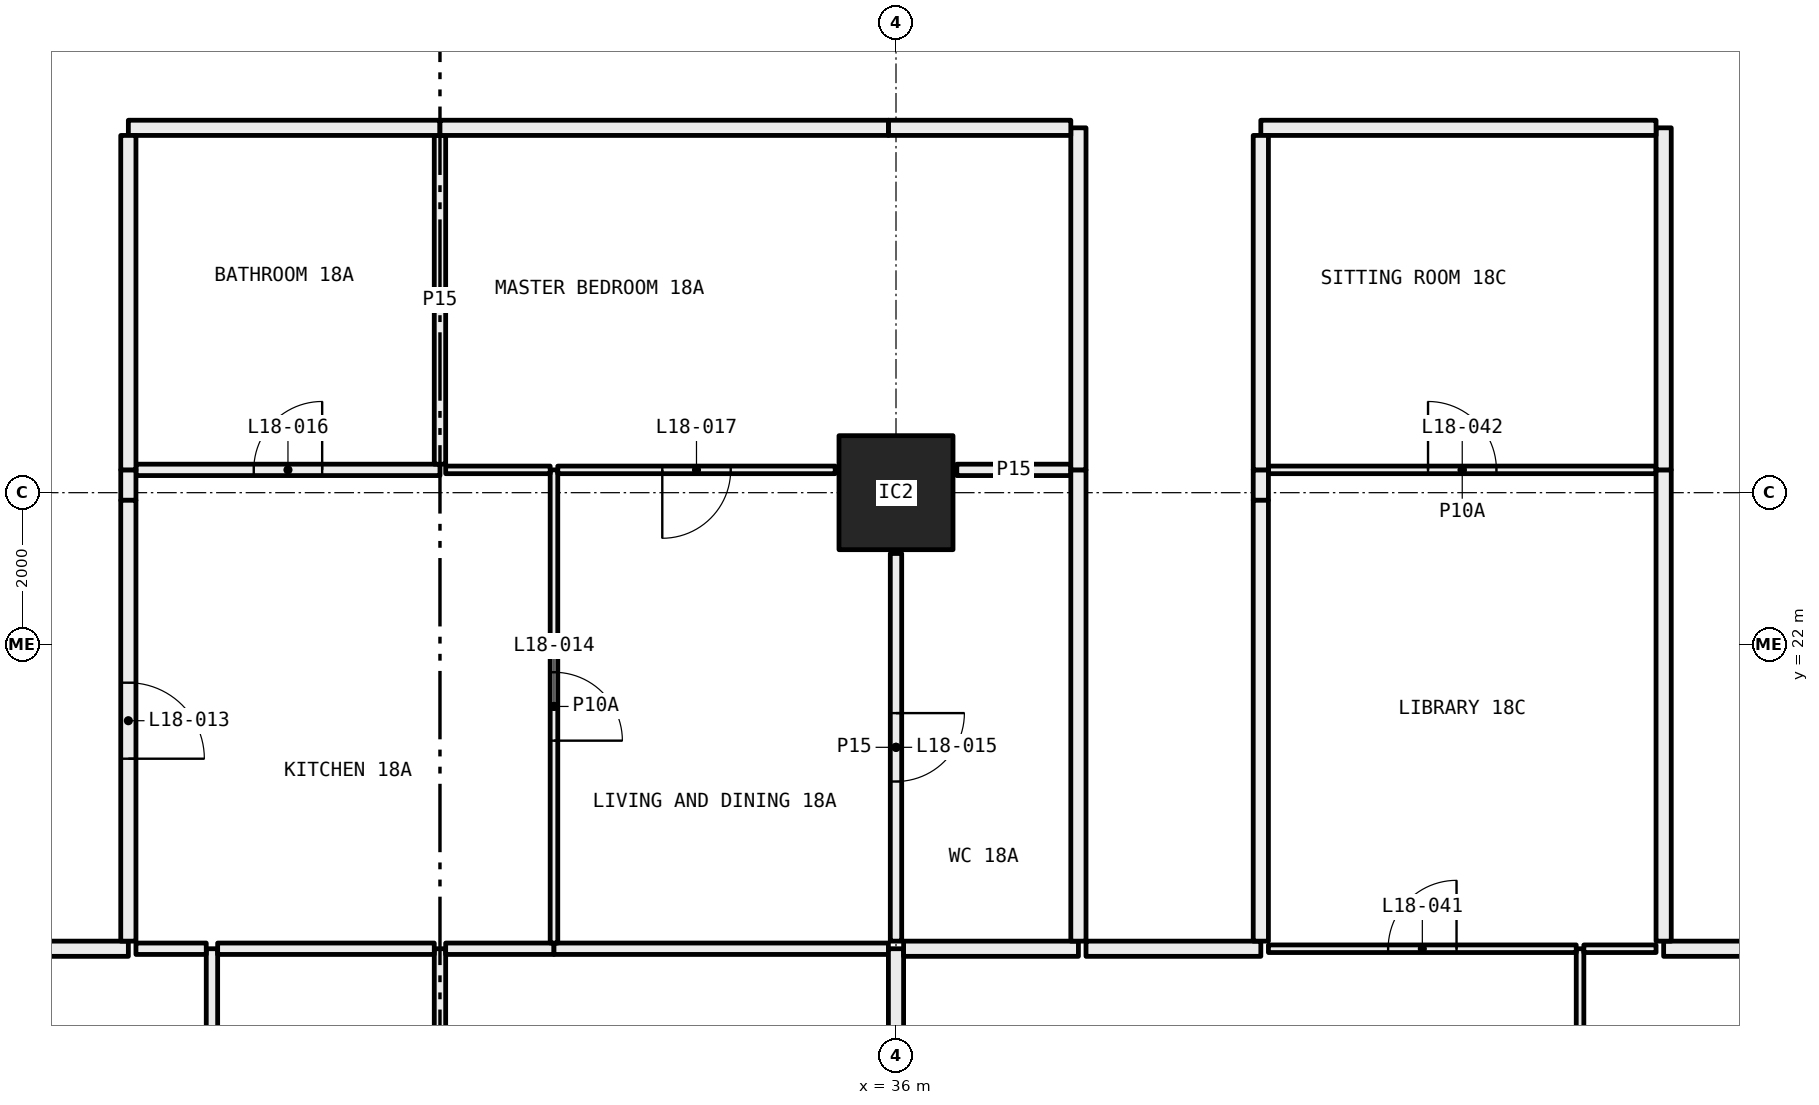
"""IFC4 building model, lengths in metres.
Left out: names, types, materials, properties, quantities, classifications, styles, units other than length and angle.
Written with IfcOpenShell. Run it as: python <this file> out.ifc"""

import sys

from ifc_helpers import new_model, si_unit, direction, frame, frame_2d, origin, origin_2d, place, context, subcontext, project, spatial, rectangle, hollow_rectangle, extrude, element, fill, save


model = new_model("IFC4")
c1 = context("Model", 3, precision=1e-05, world=origin(), true_north=direction((0.0, 1.0)))
c2 = subcontext(c1, "Body", "Model", "MODEL_VIEW")
j1 = project(units=[si_unit("LENGTHUNIT", "METRE"), si_unit("PLANEANGLEUNIT", "RADIAN")], contexts=[c1])
p1 = place(None, origin())
s1 = spatial("IfcSite", under=j1, at=p1, CompositionType="ELEMENT")
p2 = place(p1, origin())
s2 = spatial("IfcBuilding", under=s1, at=p2, CompositionType="ELEMENT")
p3 = place(p2, frame((0.0, 0.0, 74.85)))
s3 = spatial("IfcBuildingStorey", under=s2, at=p3, CompositionType="ELEMENT", Elevation=74.85)
p4 = place(p3, frame((36.0, 24.0, 0.0), z_axis=(0.0, 0.0, 1.0), x_axis=(1.0, 0.0, 0.0)))
e1 = element("IfcColumn", 1, at=p4, inside=s3, PredefinedType="COLUMN", context=c2, shape_type="SweptSolid", body=[
    extrude(hollow_rectangle(XDim=1.5, YDim=1.5, WallThickness=0.065, at=origin_2d()), origin(), (0.0, 0.0, 1.0), 3.05),
])
p5 = place(p3, frame((27.0, 12.075, 0.0), z_axis=(0.0, 0.0, 1.0), x_axis=(0.0, 1.0, 0.0)))
e2 = element("IfcWall", 2, at=p5, inside=s3, PredefinedType="PARTITIONING", context=c2, shape_type="SweptSolid", body=[
    extrude(rectangle(XDim=5.925, YDim=0.15, at=frame_2d((2.962, 0.0))), origin(), (0.0, 0.0, 1.0), 2.45),
])
p6 = place(p3, frame((26.925, 18.0, 0.0), z_axis=(0.0, 0.0, 1.0), x_axis=(-1.0, 0.0, 0.0)))
e3 = element("IfcWall", 3, at=p6, inside=s3, PredefinedType="PARTITIONING", context=c2, shape_type="SweptSolid", body=[
    extrude(rectangle(XDim=0.925, YDim=0.15, at=frame_2d((0.462, 0.0))), origin(), (0.0, 0.0, 1.0), 3.05),
])
p7 = place(p3, frame((25.9, 18.0, 0.0), z_axis=(0.0, 0.0, 1.0), x_axis=(-1.0, 0.0, 0.0)))
e4 = element("IfcWall", 4, at=p7, inside=s3, PredefinedType="PARTITIONING", context=c2, shape_type="SweptSolid", body=[
    extrude(rectangle(XDim=3.4, YDim=0.2, at=frame_2d((1.7, 0.0))), origin(), (0.0, 0.0, 1.0), 3.05),
])
p8 = place(p3, frame((30.0, 12.075, 0.0), z_axis=(0.0, 0.0, 1.0), x_axis=(0.0, 1.0, 0.0)))
e5 = element("IfcWall", 5, at=p8, inside=s3, PredefinedType="PARTITIONING", context=c2, shape_type="SweptSolid", body=[
    extrude(rectangle(XDim=5.925, YDim=0.15, at=frame_2d((2.962, 0.0))), origin(), (0.0, 0.0, 1.0), 2.45),
])
p9 = place(p3, frame((29.925, 18.0, 0.0), z_axis=(0.0, 0.0, 1.0), x_axis=(-1.0, 0.0, 0.0)))
e6 = element("IfcWall", 6, at=p9, inside=s3, PredefinedType="PARTITIONING", context=c2, shape_type="SweptSolid", body=[
    extrude(rectangle(XDim=2.85, YDim=0.15, at=frame_2d((1.425, 0.0))), origin(), (0.0, 0.0, 1.0), 3.05),
])
p10 = place(p3, frame((31.5, 18.0, 0.0), z_axis=(0.0, 0.0, 1.0), x_axis=(-1.0, 0.0, 0.0)))
e7 = element("IfcWall", 7, at=p10, inside=s3, PredefinedType="PARTITIONING", context=c2, shape_type="SweptSolid", body=[
    extrude(rectangle(XDim=1.425, YDim=0.15, at=frame_2d((0.712, 0.0))), origin(), (0.0, 0.0, 1.0), 3.05),
])
p11 = place(p3, frame((35.9, 18.0, 0.0), z_axis=(0.0, 0.0, 1.0), x_axis=(-1.0, 0.0, 0.0)))
e8 = element("IfcWall", 8, at=p11, inside=s3, PredefinedType="PARTITIONING", context=c2, shape_type="SweptSolid", body=[
    extrude(rectangle(XDim=4.4, YDim=0.15, at=frame_2d((2.2, 0.0))), origin(), (0.0, 0.0, 1.0), 3.05),
])
p12 = place(p3, frame((36.0, 12.8, 0.0), z_axis=(0.0, 0.0, 1.0), x_axis=(0.0, 1.0, 0.0)))
e9 = element("IfcWall", 9, at=p12, inside=s3, PredefinedType="PARTITIONING", context=c2, shape_type="SweptSolid", body=[
    extrude(rectangle(XDim=5.2, YDim=0.2, at=frame_2d((2.6, 0.0))), origin(), (0.0, 0.0, 1.0), 2.45),
])
p13 = place(p3, frame((31.5, 18.075, 0.0), z_axis=(0.0, 0.0, 1.0), x_axis=(0.0, 1.0, 0.0)))
e10 = element("IfcWall", 10, at=p13, inside=s3, PredefinedType="PARTITIONING", context=c2, shape_type="SweptSolid", body=[
    extrude(rectangle(XDim=6.225, YDim=0.1, at=frame_2d((3.113, 0.0))), origin(), (0.0, 0.0, 1.0), 2.45),
])
p14 = place(p13, frame((2.663, 0.0, 0.0)))
e11 = element("IfcOpeningElement", 11, at=p14, cuts=e10, PredefinedType="OPENING", context=c2, shape_type="SweptSolid", body=[
    extrude(rectangle(XDim=0.9, YDim=2.1, at=frame_2d((0.45, 1.05))), frame((0.0, 0.06, 0.0), z_axis=(0.0, -1.0, 0.0), x_axis=(1.0, 0.0, 0.0)), (0.0, 0.0, 1.0), 0.12),
])
p15 = place(p3, frame((30.0, 24.3, 0.0), z_axis=(0.0, 0.0, 1.0), x_axis=(-1.0, 0.0, 0.0)))
e12 = element("IfcWall", 12, at=p15, inside=s3, PredefinedType="PARTITIONING", context=c2, shape_type="SweptSolid", body=[
    extrude(rectangle(XDim=4.0, YDim=0.15, at=frame_2d((2.0, 0.0))), origin(), (0.0, 0.0, 1.0), 3.05),
])
p16 = place(p15, frame((1.55, 0.0, 0.0)))
e13 = element("IfcOpeningElement", 13, at=p16, cuts=e12, PredefinedType="OPENING", context=c2, shape_type="SweptSolid", body=[
    extrude(rectangle(XDim=0.9, YDim=2.1, at=frame_2d((0.45, 1.05))), frame((0.0, 0.085, 0.0), z_axis=(0.0, -1.0, 0.0), x_axis=(1.0, 0.0, 0.0)), (0.0, 0.0, 1.0), 0.17),
])
p17 = place(p3, frame((31.45, 24.3, 0.0), z_axis=(0.0, 0.0, 1.0), x_axis=(-1.0, 0.0, 0.0)))
e14 = element("IfcWall", 14, at=p17, inside=s3, PredefinedType="PARTITIONING", context=c2, shape_type="SweptSolid", body=[
    extrude(rectangle(XDim=1.375, YDim=0.1, at=frame_2d((0.688, 0.0))), origin(), (0.0, 0.0, 1.0), 3.05),
])
p18 = place(p3, frame((25.9, 24.3, 0.0), z_axis=(0.0, 0.0, 1.0), x_axis=(0.0, -1.0, 0.0)))
e15 = element("IfcWall", 15, at=p18, inside=s3, PredefinedType="PARTITIONING", context=c2, shape_type="SweptSolid", body=[
    extrude(rectangle(XDim=0.4, YDim=0.2, at=frame_2d((0.2, 0.0))), origin(), (0.0, 0.0, 1.0), 2.45),
])
p19 = place(p3, frame((25.9, 23.9, 0.0), z_axis=(0.0, 0.0, 1.0), x_axis=(0.0, -1.0, 0.0)))
e16 = element("IfcWall", 16, at=p19, inside=s3, PredefinedType="PARTITIONING", context=c2, shape_type="SweptSolid", body=[
    extrude(rectangle(XDim=5.8, YDim=0.2, at=frame_2d((2.9, 0.0))), origin(), (0.0, 0.0, 1.0), 3.05),
])
p20 = place(p19, frame((2.4, 0.0, 0.0)))
e17 = element("IfcOpeningElement", 17, at=p20, cuts=e16, PredefinedType="OPENING", context=c2, shape_type="SweptSolid", body=[
    extrude(rectangle(XDim=1.0, YDim=2.1, at=frame_2d((0.5, 1.05))), frame((0.0, 0.11, 0.0), z_axis=(0.0, -1.0, 0.0), x_axis=(1.0, 0.0, 0.0)), (0.0, 0.0, 1.0), 0.22),
])
p21 = place(p3, frame((36.0, 18.1, 0.0), z_axis=(0.0, 0.0, 1.0), x_axis=(0.0, 1.0, 0.0)))
e18 = element("IfcWall", 18, at=p21, inside=s3, PredefinedType="PARTITIONING", context=c2, shape_type="SweptSolid", body=[
    extrude(rectangle(XDim=5.1, YDim=0.15, at=frame_2d((2.55, 0.0))), origin(), (0.0, 0.0, 1.0), 2.45),
])
p22 = place(p21, frame((2.1, 0.0, 0.0)))
e19 = element("IfcOpeningElement", 19, at=p22, cuts=e18, PredefinedType="OPENING", context=c2, shape_type="SweptSolid", body=[
    extrude(rectangle(XDim=0.9, YDim=2.1, at=frame_2d((0.45, 1.05))), frame((0.0, 0.085, 0.0), z_axis=(0.0, -1.0, 0.0), x_axis=(1.0, 0.0, 0.0)), (0.0, 0.0, 1.0), 0.17),
])
p23 = place(p3, frame((35.2, 24.3, 0.0), z_axis=(0.0, 0.0, 1.0), x_axis=(-1.0, 0.0, 0.0)))
e20 = element("IfcWall", 20, at=p23, inside=s3, PredefinedType="PARTITIONING", context=c2, shape_type="SweptSolid", body=[
    extrude(rectangle(XDim=3.65, YDim=0.1, at=frame_2d((1.825, 0.0))), origin(), (0.0, 0.0, 1.0), 3.05),
])
p24 = place(p23, frame((1.375, 0.0, 0.0)))
e21 = element("IfcOpeningElement", 21, at=p24, cuts=e20, PredefinedType="OPENING", context=c2, shape_type="SweptSolid", body=[
    extrude(rectangle(XDim=0.9, YDim=2.1, at=frame_2d((0.45, 1.05))), frame((0.0, 0.06, 0.0), z_axis=(0.0, -1.0, 0.0), x_axis=(1.0, 0.0, 0.0)), (0.0, 0.0, 1.0), 0.12),
])
p25 = place(p3, frame((38.3, 24.3, 0.0), z_axis=(0.0, 0.0, 1.0), x_axis=(-1.0, 0.0, 0.0)))
e22 = element("IfcWall", 22, at=p25, inside=s3, PredefinedType="PARTITIONING", context=c2, shape_type="SweptSolid", body=[
    extrude(rectangle(XDim=1.5, YDim=0.15, at=frame_2d((0.75, 0.0))), origin(), (0.0, 0.0, 1.0), 3.05),
])
p26 = place(p3, frame((36.1, 18.0, 0.0), z_axis=(0.0, 0.0, 1.0), x_axis=(1.0, 0.0, 0.0)))
e23 = element("IfcWall", 23, at=p26, inside=s3, PredefinedType="PARTITIONING", context=c2, shape_type="SweptSolid", body=[
    extrude(rectangle(XDim=2.3, YDim=0.2, at=frame_2d((1.15, 0.0))), origin(), (0.0, 0.0, 1.0), 3.05),
])
p27 = place(p3, frame((38.4, 18.1, 0.0), z_axis=(0.0, 0.0, 1.0), x_axis=(0.0, 1.0, 0.0)))
e24 = element("IfcWall", 24, at=p27, inside=s3, PredefinedType="PARTITIONING", context=c2, shape_type="SweptSolid", body=[
    extrude(rectangle(XDim=6.2, YDim=0.2, at=frame_2d((3.1, 0.0))), origin(), (0.0, 0.0, 1.0), 2.45),
])
p28 = place(p3, frame((30.0, 24.375, 0.0), z_axis=(0.0, 0.0, 1.0), x_axis=(0.0, 1.0, 0.0)))
e25 = element("IfcWall", 25, at=p28, inside=s3, PredefinedType="PARTITIONING", context=c2, shape_type="SweptSolid", body=[
    extrude(rectangle(XDim=4.325, YDim=0.15, at=frame_2d((2.163, 0.0))), origin(), (0.0, 0.0, 1.0), 3.05),
])
p29 = place(p3, frame((30.0, 28.8, 0.0), z_axis=(0.0, 0.0, 1.0), x_axis=(-1.0, 0.0, 0.0)))
e26 = element("IfcWall", 26, at=p29, inside=s3, PredefinedType="PARTITIONING", context=c2, shape_type="SweptSolid", body=[
    extrude(rectangle(XDim=4.1, YDim=0.2, at=frame_2d((2.05, 0.0))), origin(), (0.0, 0.0, 1.0), 3.05),
])
p30 = place(p3, frame((25.9, 28.7, 0.0), z_axis=(0.0, 0.0, 1.0), x_axis=(0.0, -1.0, 0.0)))
e27 = element("IfcWall", 27, at=p30, inside=s3, PredefinedType="PARTITIONING", context=c2, shape_type="SweptSolid", body=[
    extrude(rectangle(XDim=4.4, YDim=0.2, at=frame_2d((2.2, 0.0))), origin(), (0.0, 0.0, 1.0), 3.05),
])
p31 = place(p3, frame((38.4, 24.3, 0.0), z_axis=(0.0, 0.0, 1.0), x_axis=(0.0, 1.0, 0.0)))
e28 = element("IfcWall", 28, at=p31, inside=s3, PredefinedType="PARTITIONING", context=c2, shape_type="SweptSolid", body=[
    extrude(rectangle(XDim=4.5, YDim=0.2, at=frame_2d((2.25, 0.0))), origin(), (0.0, 0.0, 1.0), 3.05),
])
p32 = place(p3, frame((38.3, 28.8, 0.0), z_axis=(0.0, 0.0, 1.0), x_axis=(-1.0, 0.0, 0.0)))
e29 = element("IfcWall", 29, at=p32, inside=s3, PredefinedType="PARTITIONING", context=c2, shape_type="SweptSolid", body=[
    extrude(rectangle(XDim=2.4, YDim=0.2, at=frame_2d((1.2, 0.0))), origin(), (0.0, 0.0, 1.0), 2.45),
])
p33 = place(p3, frame((35.9, 28.8, 0.0), z_axis=(0.0, 0.0, 1.0), x_axis=(-1.0, 0.0, 0.0)))
e30 = element("IfcWall", 30, at=p33, inside=s3, PredefinedType="PARTITIONING", context=c2, shape_type="SweptSolid", body=[
    extrude(rectangle(XDim=5.9, YDim=0.2, at=frame_2d((2.95, 0.0))), origin(), (0.0, 0.0, 1.0), 3.05),
])
p34 = place(p3, frame((45.0, 12.05, 0.0), z_axis=(0.0, 0.0, 1.0), x_axis=(0.0, 1.0, 0.0)))
e31 = element("IfcWall", 31, at=p34, inside=s3, PredefinedType="PARTITIONING", context=c2, shape_type="SweptSolid", body=[
    extrude(rectangle(XDim=5.95, YDim=0.1, at=frame_2d((2.975, 0.0))), origin(), (0.0, 0.0, 1.0), 2.45),
])
p35 = place(p3, frame((44.95, 18.0, 0.0), z_axis=(0.0, 0.0, 1.0), x_axis=(-1.0, 0.0, 0.0)))
e32 = element("IfcWall", 32, at=p35, inside=s3, PredefinedType="PARTITIONING", context=c2, shape_type="SweptSolid", body=[
    extrude(rectangle(XDim=4.05, YDim=0.1, at=frame_2d((2.025, 0.0))), origin(), (0.0, 0.0, 1.0), 3.05),
])
p36 = place(p35, frame((1.575, 0.0, 0.0)))
e33 = element("IfcOpeningElement", 33, at=p36, cuts=e32, PredefinedType="OPENING", context=c2, shape_type="SweptSolid", body=[
    extrude(rectangle(XDim=0.9, YDim=2.1, at=frame_2d((0.45, 1.05))), frame((0.0, 0.06, 0.0), z_axis=(0.0, -1.0, 0.0), x_axis=(1.0, 0.0, 0.0)), (0.0, 0.0, 1.0), 0.12),
])
p37 = place(p3, frame((40.8, 18.0, 0.0), z_axis=(0.0, 0.0, 1.0), x_axis=(-1.0, 0.0, 0.0)))
e34 = element("IfcWall", 34, at=p37, inside=s3, PredefinedType="PARTITIONING", context=c2, shape_type="SweptSolid", body=[
    extrude(rectangle(XDim=2.3, YDim=0.2, at=frame_2d((1.15, 0.0))), origin(), (0.0, 0.0, 1.0), 3.05),
])
p38 = place(p3, frame((46.0, 18.0, 0.0), z_axis=(0.0, 0.0, 1.0), x_axis=(-1.0, 0.0, 0.0)))
e35 = element("IfcWall", 35, at=p38, inside=s3, PredefinedType="PARTITIONING", context=c2, shape_type="SweptSolid", body=[
    extrude(rectangle(XDim=0.95, YDim=0.1, at=frame_2d((0.475, 0.0))), origin(), (0.0, 0.0, 1.0), 3.05),
])
p39 = place(p3, frame((52.5, 18.0, 0.0), z_axis=(0.0, 0.0, 1.0), x_axis=(-1.0, 0.0, 0.0)))
e36 = element("IfcWall", 36, at=p39, inside=s3, PredefinedType="PARTITIONING", context=c2, shape_type="SweptSolid", body=[
    extrude(rectangle(XDim=6.4, YDim=0.2, at=frame_2d((3.2, 0.0))), origin(), (0.0, 0.0, 1.0), 3.05),
])
p40 = place(p3, frame((46.0, 24.3, 0.0), z_axis=(0.0, 0.0, 1.0), x_axis=(-1.0, 0.0, 0.0)))
e37 = element("IfcWall", 37, at=p40, inside=s3, PredefinedType="PARTITIONING", context=c2, shape_type="SweptSolid", body=[
    extrude(rectangle(XDim=5.1, YDim=0.1, at=frame_2d((2.55, 0.0))), origin(), (0.0, 0.0, 1.0), 3.05),
])
p41 = place(p40, frame((2.1, 0.0, 0.0)))
e38 = element("IfcOpeningElement", 38, at=p41, cuts=e37, PredefinedType="OPENING", context=c2, shape_type="SweptSolid", body=[
    extrude(rectangle(XDim=0.9, YDim=2.1, at=frame_2d((0.45, 1.05))), frame((0.0, 0.06, 0.0), z_axis=(0.0, -1.0, 0.0), x_axis=(1.0, 0.0, 0.0)), (0.0, 0.0, 1.0), 0.12),
])
p42 = place(p3, frame((40.8, 24.3, 0.0), z_axis=(0.0, 0.0, 1.0), x_axis=(0.0, -1.0, 0.0)))
e39 = element("IfcWall", 39, at=p42, inside=s3, PredefinedType="PARTITIONING", context=c2, shape_type="SweptSolid", body=[
    extrude(rectangle(XDim=0.4, YDim=0.2, at=frame_2d((0.2, 0.0))), origin(), (0.0, 0.0, 1.0), 2.45),
])
p43 = place(p3, frame((40.8, 23.9, 0.0), z_axis=(0.0, 0.0, 1.0), x_axis=(0.0, -1.0, 0.0)))
e40 = element("IfcWall", 40, at=p43, inside=s3, PredefinedType="PARTITIONING", context=c2, shape_type="SweptSolid", body=[
    extrude(rectangle(XDim=5.8, YDim=0.2, at=frame_2d((2.9, 0.0))), origin(), (0.0, 0.0, 1.0), 3.05),
])
p44 = place(p3, frame((46.1, 18.1, 0.0), z_axis=(0.0, 0.0, 1.0), x_axis=(0.0, 1.0, 0.0)))
e41 = element("IfcWall", 41, at=p44, inside=s3, PredefinedType="PARTITIONING", context=c2, shape_type="SweptSolid", body=[
    extrude(rectangle(XDim=6.2, YDim=0.2, at=frame_2d((3.1, 0.0))), origin(), (0.0, 0.0, 1.0), 2.45),
])
p45 = place(p3, frame((46.1, 24.3, 0.0), z_axis=(0.0, 0.0, 1.0), x_axis=(0.0, 1.0, 0.0)))
e42 = element("IfcWall", 42, at=p45, inside=s3, PredefinedType="PARTITIONING", context=c2, shape_type="SweptSolid", body=[
    extrude(rectangle(XDim=4.5, YDim=0.2, at=frame_2d((2.25, 0.0))), origin(), (0.0, 0.0, 1.0), 3.05),
])
p46 = place(p3, frame((46.0, 28.8, 0.0), z_axis=(0.0, 0.0, 1.0), x_axis=(-1.0, 0.0, 0.0)))
e43 = element("IfcWall", 43, at=p46, inside=s3, PredefinedType="PARTITIONING", context=c2, shape_type="SweptSolid", body=[
    extrude(rectangle(XDim=5.2, YDim=0.2, at=frame_2d((2.6, 0.0))), origin(), (0.0, 0.0, 1.0), 3.05),
])
p47 = place(p3, frame((40.8, 28.7, 0.0), z_axis=(0.0, 0.0, 1.0), x_axis=(0.0, -1.0, 0.0)))
e44 = element("IfcWall", 44, at=p47, inside=s3, PredefinedType="PARTITIONING", context=c2, shape_type="SweptSolid", body=[
    extrude(rectangle(XDim=4.4, YDim=0.2, at=frame_2d((2.2, 0.0))), origin(), (0.0, 0.0, 1.0), 3.05),
])
p48 = place(p20, origin())
e45 = element("IfcDoor", 45, at=p48, inside=s3, OperationType="SINGLE_SWING_LEFT", PredefinedType="DOOR", context=c2, shape_type="SweptSolid", body=[
    extrude(rectangle(XDim=1.0, YDim=2.1, at=frame_2d((0.5, 1.05))), frame((0.0, 0.025, 0.0), z_axis=(0.0, -1.0, 0.0), x_axis=(1.0, 0.0, 0.0)), (0.0, 0.0, 1.0), 0.05),
])
fill(e17, e45)
p49 = place(p14, frame((0.9, 0.0, 0.0), x_axis=(-1.0, 0.0, 0.0)))
e46 = element("IfcDoor", 46, at=p49, inside=s3, OperationType="SINGLE_SWING_LEFT", PredefinedType="DOOR", context=c2, shape_type="SweptSolid", body=[
    extrude(rectangle(XDim=0.9, YDim=2.1, at=frame_2d((0.45, 1.05))), frame((0.0, 0.025, 0.0), z_axis=(0.0, -1.0, 0.0), x_axis=(1.0, 0.0, 0.0)), (0.0, 0.0, 1.0), 0.05),
])
fill(e11, e46)
p50 = place(p22, frame((0.9, 0.0, 0.0), x_axis=(-1.0, 0.0, 0.0)))
e47 = element("IfcDoor", 47, at=p50, inside=s3, OperationType="SINGLE_SWING_RIGHT", PredefinedType="DOOR", context=c2, shape_type="SweptSolid", body=[
    extrude(rectangle(XDim=0.9, YDim=2.1, at=frame_2d((0.45, 1.05))), frame((0.0, 0.025, 0.0), z_axis=(0.0, -1.0, 0.0), x_axis=(1.0, 0.0, 0.0)), (0.0, 0.0, 1.0), 0.05),
])
fill(e19, e47)
p51 = place(p16, frame((0.9, 0.0, 0.0), x_axis=(-1.0, 0.0, 0.0)))
e48 = element("IfcDoor", 48, at=p51, inside=s3, OperationType="SINGLE_SWING_LEFT", PredefinedType="DOOR", context=c2, shape_type="SweptSolid", body=[
    extrude(rectangle(XDim=0.9, YDim=2.1, at=frame_2d((0.45, 1.05))), frame((0.0, 0.025, 0.0), z_axis=(0.0, -1.0, 0.0), x_axis=(1.0, 0.0, 0.0)), (0.0, 0.0, 1.0), 0.05),
])
fill(e13, e48)
p52 = place(p24, origin())
e49 = element("IfcDoor", 49, at=p52, inside=s3, OperationType="SINGLE_SWING_LEFT", PredefinedType="DOOR", context=c2, shape_type="SweptSolid", body=[
    extrude(rectangle(XDim=0.9, YDim=2.1, at=frame_2d((0.45, 1.05))), frame((0.0, 0.025, 0.0), z_axis=(0.0, -1.0, 0.0), x_axis=(1.0, 0.0, 0.0)), (0.0, 0.0, 1.0), 0.05),
])
fill(e21, e49)
p53 = place(p36, frame((0.9, 0.0, 0.0), x_axis=(-1.0, 0.0, 0.0)))
e50 = element("IfcDoor", 50, at=p53, inside=s3, OperationType="SINGLE_SWING_LEFT", PredefinedType="DOOR", context=c2, shape_type="SweptSolid", body=[
    extrude(rectangle(XDim=0.9, YDim=2.1, at=frame_2d((0.45, 1.05))), frame((0.0, 0.025, 0.0), z_axis=(0.0, -1.0, 0.0), x_axis=(1.0, 0.0, 0.0)), (0.0, 0.0, 1.0), 0.05),
])
fill(e33, e50)
p54 = place(p41, frame((0.9, 0.0, 0.0), x_axis=(-1.0, 0.0, 0.0)))
e51 = element("IfcDoor", 51, at=p54, inside=s3, OperationType="SINGLE_SWING_RIGHT", PredefinedType="DOOR", context=c2, shape_type="SweptSolid", body=[
    extrude(rectangle(XDim=0.9, YDim=2.1, at=frame_2d((0.45, 1.05))), frame((0.0, 0.025, 0.0), z_axis=(0.0, -1.0, 0.0), x_axis=(1.0, 0.0, 0.0)), (0.0, 0.0, 1.0), 0.05),
])
fill(e38, e51)
save(model, sys.argv[1])
